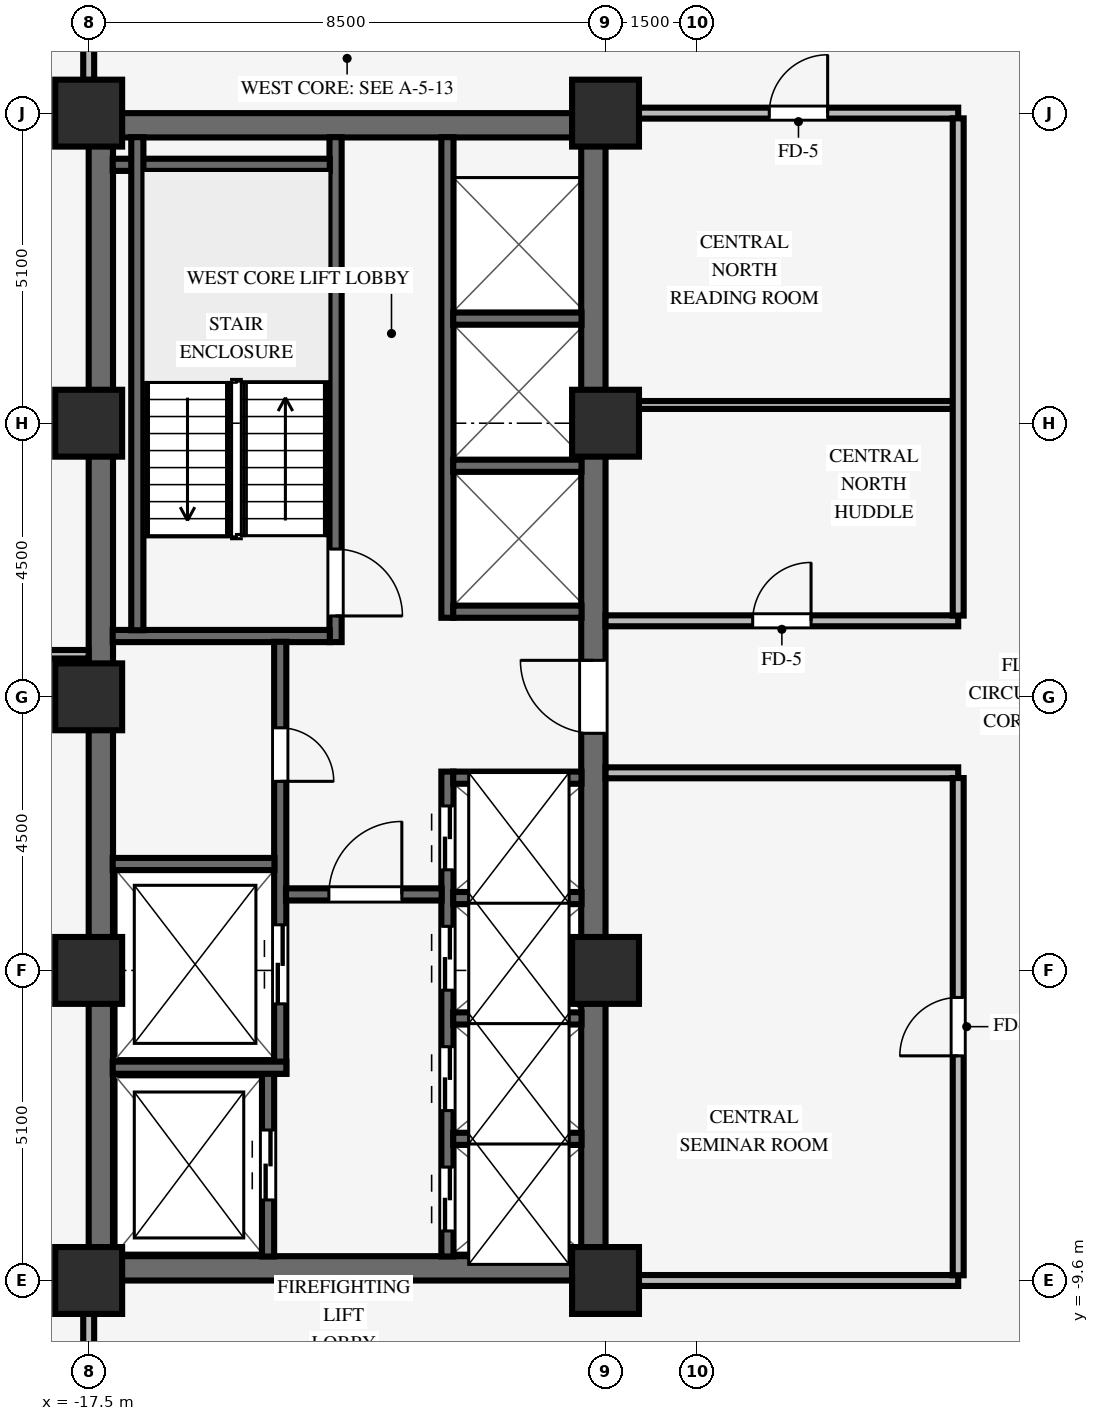
"""IFC4 building model, lengths in metres.
Left out: names, types, materials, properties, quantities, classifications, styles, units other than length and angle.
Written with IfcOpenShell. Run it as: python <this file> out.ifc"""

import sys

from ifc_helpers import new_model, si_unit, direction, frame, frame_2d, origin, origin_2d, place, context, subcontext, project, spatial, rectangle, extrude, source, transform, mapped, element, fill, save


model = new_model("IFC4")
c1 = context("Model", 3, precision=1e-05, world=origin(), true_north=direction((0.0, 1.0)))
c2 = subcontext(c1, "Body", "Model", "MODEL_VIEW")
j1 = project(units=[si_unit("LENGTHUNIT", "METRE"), si_unit("PLANEANGLEUNIT", "RADIAN")], contexts=[c1])
p1 = place(None, origin())
s1 = spatial("IfcSite", under=j1, at=p1, CompositionType="ELEMENT")
p2 = place(p1, origin())
s2 = spatial("IfcBuilding", under=s1, at=p2, CompositionType="ELEMENT")
p3 = place(p2, frame((0.0, 0.0, 98.3)))
s3 = spatial("IfcBuildingStorey", under=s2, at=p3, CompositionType="ELEMENT", Elevation=98.3)
for number, where, z_axis, x_axis in (
    (1, (-17.5, -9.4, 0.0), (0.0, 0.0, 1.0), (1.0, 0.0, 0.0)),
    (2, (-17.5, 9.4, 0.0), (0.0, 0.0, 1.0), (1.0, 0.0, 0.0)),
):
    element("IfcWall", number, at=place(p3, frame(where, z_axis=z_axis, x_axis=x_axis)), inside=s3, PredefinedType="SHEAR", context=c2, shape_type="SweptSolid", body=[
        extrude(rectangle(XDim=8.5, YDim=0.4, at=frame_2d((4.25, 0.0))), origin(), (0.0, 0.0, 1.0), 3.37),
    ])
p4 = place(p3, frame((-17.3, -9.205, 0.0), z_axis=(0.0, 0.0, 1.0), x_axis=(0.0, 1.0, 0.0)))
e3 = element("IfcWall", 3, at=p4, inside=s3, PredefinedType="SHEAR", context=c2, shape_type="SweptSolid", body=[
    extrude(rectangle(XDim=18.41, YDim=0.4, at=frame_2d((9.205, 0.0))), origin(), (0.0, 0.0, 1.0), 3.37),
])
p5 = place(p3, frame((-9.2, -9.205, 0.0), z_axis=(0.0, 0.0, 1.0), x_axis=(0.0, 1.0, 0.0)))
e4 = element("IfcWall", 4, at=p5, inside=s3, PredefinedType="SHEAR", context=c2, shape_type="SweptSolid", body=[
    extrude(rectangle(XDim=18.41, YDim=0.4, at=frame_2d((9.205, 0.0))), origin(), (0.0, 0.0, 1.0), 3.37),
])
p6 = place(p5, frame((8.605, 0.0, 0.0)))
e5 = element("IfcOpeningElement", 5, at=p6, cuts=e4, PredefinedType="OPENING", context=c2, shape_type="SweptSolid", body=[
    extrude(rectangle(XDim=1.2, YDim=2.15, at=frame_2d((0.6, 1.075))), frame((0.0, 0.21, 0.0), z_axis=(0.0, -1.0, 0.0), x_axis=(1.0, 0.0, 0.0)), (0.0, 0.0, 1.0), 0.42),
])
for number, where, z_axis, x_axis in (
    (6, (-17.5, -9.6, 0.0), (0.0, 0.0, 1.0), (1.0, 0.0, 0.0)),
    (7, (-17.5, -4.5, 0.0), (0.0, 0.0, 1.0), (1.0, 0.0, 0.0)),
    (8, (-17.5, 4.5, 0.0), (0.0, 0.0, 1.0), (1.0, 0.0, 0.0)),
    (9, (-17.5, 9.6, 0.0), (0.0, 0.0, 1.0), (1.0, 0.0, 0.0)),
    (10, (-9.0, -9.6, 0.0), (0.0, 0.0, 1.0), (1.0, 0.0, 0.0)),
    (11, (-9.0, -4.5, 0.0), (0.0, 0.0, 1.0), (1.0, 0.0, 0.0)),
    (12, (-9.0, 4.5, 0.0), (0.0, 0.0, 1.0), (1.0, 0.0, 0.0)),
    (13, (-9.0, 9.6, 0.0), (0.0, 0.0, 1.0), (1.0, 0.0, 0.0)),
    (14, (-17.5, 0.0, 0.0), (0.0, 0.0, 1.0), (1.0, 0.0, 0.0)),
):
    element("IfcColumn", number, at=place(p3, frame(where, z_axis=z_axis, x_axis=x_axis)), inside=s3, PredefinedType="COLUMN", context=c2, shape_type="SweptSolid", body=[
        extrude(rectangle(XDim=1.1, YDim=1.1, at=origin_2d()), origin(), (0.0, 0.0, 1.0), 3.37),
    ])
p7 = place(p3, frame((-13.44, 0.9, 0.0), z_axis=(0.0, 0.0, 1.0), x_axis=(0.0, 1.0, 0.0)))
e15 = element("IfcWall", 15, at=p7, inside=s3, PredefinedType="SHEAR", context=c2, shape_type="SweptSolid", body=[
    extrude(rectangle(XDim=8.305, YDim=0.2, at=frame_2d((4.153, 0.0))), origin(), (0.0, 0.0, 1.0), 3.37),
])
p8 = place(p7, frame((1.53, 0.0, 0.0), z_axis=(0.0, 0.0, 1.0), x_axis=(-1.0, 0.0, 0.0)))
e16 = element("IfcOpeningElement", 16, at=p8, cuts=e15, PredefinedType="OPENING", context=c2, shape_type="SweptSolid", body=[
    extrude(rectangle(XDim=1.1, YDim=2.15, at=frame_2d((0.55, 1.075))), frame((0.0, 0.11, 0.0), z_axis=(0.0, -1.0, 0.0), x_axis=(1.0, 0.0, 0.0)), (0.0, 0.0, 1.0), 0.22),
])
for number, where, z_axis, x_axis in (
    (17, (-17.105, 1.0, 0.0), (0.0, 0.0, 1.0), (1.0, 0.0, 0.0)),
    (18, (-17.105, 8.75, 0.0), (0.0, 0.0, 1.0), (1.0, 0.0, 0.0)),
):
    element("IfcWall", number, at=place(p3, frame(where, z_axis=z_axis, x_axis=x_axis)), inside=s3, PredefinedType="SHEAR", context=c2, shape_type="SweptSolid", body=[
        extrude(rectangle(XDim=3.57, YDim=0.2, at=frame_2d((1.785, 0.0))), origin(), (0.0, 0.0, 1.0), 3.37),
    ])
p9 = place(p3, frame((-16.7, 1.095, 0.0), z_axis=(0.0, 0.0, 1.0), x_axis=(0.0, 1.0, 0.0)))
e19 = element("IfcWall", 19, at=p9, inside=s3, PredefinedType="SHEAR", context=c2, shape_type="SweptSolid", body=[
    extrude(rectangle(XDim=8.11, YDim=0.2, at=frame_2d((4.055, 0.0))), origin(), (0.0, 0.0, 1.0), 3.37),
])
p10 = place(p3, frame((-14.55, -9.205, 0.0), z_axis=(0.0, 0.0, 1.0), x_axis=(0.0, 1.0, 0.0)))
e20 = element("IfcWall", 20, at=p10, inside=s3, PredefinedType="SHEAR", context=c2, shape_type="SweptSolid", body=[
    extrude(rectangle(XDim=3.01, YDim=0.2, at=frame_2d((1.505, 0.0))), origin(), (0.0, 0.0, 1.0), 3.37),
])
p11 = place(p10, frame((0.93, 0.0, 0.0)))
e21 = element("IfcOpeningElement", 21, at=p11, cuts=e20, PredefinedType="OPENING", context=c2, shape_type="SweptSolid", body=[
    extrude(rectangle(XDim=1.15, YDim=2.15, at=frame_2d((0.575, 1.075))), frame((0.0, 0.11, 0.0), z_axis=(0.0, -1.0, 0.0), x_axis=(1.0, 0.0, 0.0)), (0.0, 0.0, 1.0), 0.22),
])
p12 = place(p3, frame((-14.35, -6.2, 0.0), z_axis=(0.0, 0.0, 1.0), x_axis=(0.0, 1.0, 0.0)))
e22 = element("IfcWall", 22, at=p12, inside=s3, PredefinedType="SHEAR", context=c2, shape_type="SweptSolid", body=[
    extrude(rectangle(XDim=7.105, YDim=0.2, at=frame_2d((3.552, 0.0))), origin(), (0.0, 0.0, 1.0), 3.37),
])
p13 = place(p12, frame((5.69, 0.0, 0.0), z_axis=(0.0, 0.0, 1.0), x_axis=(-1.0, 0.0, 0.0)))
e23 = element("IfcOpeningElement", 23, at=p13, cuts=e22, PredefinedType="OPENING", context=c2, shape_type="SweptSolid", body=[
    extrude(rectangle(XDim=0.88, YDim=2.1, at=frame_2d((0.44, 1.05))), frame((0.0, 0.11, 0.0), z_axis=(0.0, -1.0, 0.0), x_axis=(1.0, 0.0, 0.0)), (0.0, 0.0, 1.0), 0.22),
])
p14 = place(p12, frame((1.15, 0.0, 0.0)))
e24 = element("IfcOpeningElement", 24, at=p14, cuts=e22, PredefinedType="OPENING", context=c2, shape_type="SweptSolid", body=[
    extrude(rectangle(XDim=1.3, YDim=2.2, at=frame_2d((0.65, 1.1))), frame((0.0, 0.11, 0.0), z_axis=(0.0, -1.0, 0.0), x_axis=(1.0, 0.0, 0.0)), (0.0, 0.0, 1.0), 0.22),
])
p15 = place(p3, frame((-17.105, -6.1, 0.0), z_axis=(0.0, 0.0, 1.0), x_axis=(1.0, 0.0, 0.0)))
e25 = element("IfcWall", 25, at=p15, inside=s3, PredefinedType="SHEAR", context=c2, shape_type="SweptSolid", body=[
    extrude(rectangle(XDim=2.855, YDim=0.2, at=frame_2d((1.427, 0.0))), origin(), (0.0, 0.0, 1.0), 3.37),
])
p16 = place(p3, frame((-17.105, -2.75, 0.0), z_axis=(0.0, 0.0, 1.0), x_axis=(1.0, 0.0, 0.0)))
e26 = element("IfcWall", 26, at=p16, inside=s3, PredefinedType="SHEAR", context=c2, shape_type="SweptSolid", body=[
    extrude(rectangle(XDim=2.66, YDim=0.2, at=frame_2d((1.33, 0.0))), origin(), (0.0, 0.0, 1.0), 3.37),
])
p17 = place(p3, frame((-11.6, -9.205, 0.0), z_axis=(0.0, 0.0, 1.0), x_axis=(0.0, 1.0, 0.0)))
e27 = element("IfcWall", 27, at=p17, inside=s3, PredefinedType="SHEAR", context=c2, shape_type="SweptSolid", body=[
    extrude(rectangle(XDim=7.975, YDim=0.2, at=frame_2d((3.988, 0.0))), origin(), (0.0, 0.0, 1.0), 3.37),
])
p18 = place(p17, frame((0.42, 0.0, 0.0)))
e28 = element("IfcOpeningElement", 28, at=p18, cuts=e27, PredefinedType="OPENING", context=c2, shape_type="SweptSolid", body=[
    extrude(rectangle(XDim=1.05, YDim=2.15, at=frame_2d((0.525, 1.075))), frame((0.0, 0.11, 0.0), z_axis=(0.0, -1.0, 0.0), x_axis=(1.0, 0.0, 0.0)), (0.0, 0.0, 1.0), 0.22),
])
p19 = place(p17, frame((2.4, 0.0, 0.0)))
e29 = element("IfcOpeningElement", 29, at=p19, cuts=e27, PredefinedType="OPENING", context=c2, shape_type="SweptSolid", body=[
    extrude(rectangle(XDim=1.05, YDim=2.15, at=frame_2d((0.525, 1.075))), frame((0.0, 0.11, 0.0), z_axis=(0.0, -1.0, 0.0), x_axis=(1.0, 0.0, 0.0)), (0.0, 0.0, 1.0), 0.22),
])
p20 = place(p17, frame((4.38, 0.0, 0.0)))
e30 = element("IfcOpeningElement", 30, at=p20, cuts=e27, PredefinedType="OPENING", context=c2, shape_type="SweptSolid", body=[
    extrude(rectangle(XDim=1.05, YDim=2.15, at=frame_2d((0.525, 1.075))), frame((0.0, 0.11, 0.0), z_axis=(0.0, -1.0, 0.0), x_axis=(1.0, 0.0, 0.0)), (0.0, 0.0, 1.0), 0.22),
])
p21 = place(p17, frame((6.36, 0.0, 0.0)))
e31 = element("IfcOpeningElement", 31, at=p21, cuts=e27, PredefinedType="OPENING", context=c2, shape_type="SweptSolid", body=[
    extrude(rectangle(XDim=1.05, YDim=2.15, at=frame_2d((0.525, 1.075))), frame((0.0, 0.11, 0.0), z_axis=(0.0, -1.0, 0.0), x_axis=(1.0, 0.0, 0.0)), (0.0, 0.0, 1.0), 0.22),
])
p22 = place(p3, frame((-14.255, -3.25, 0.0), z_axis=(0.0, 0.0, 1.0), x_axis=(1.0, 0.0, 0.0)))
e32 = element("IfcWall", 32, at=p22, inside=s3, PredefinedType="SHEAR", context=c2, shape_type="SweptSolid", body=[
    extrude(rectangle(XDim=2.56, YDim=0.2, at=frame_2d((1.28, 0.0))), origin(), (0.0, 0.0, 1.0), 3.37),
])
p23 = place(p22, frame((0.705, 0.0, 0.0)))
e33 = element("IfcOpeningElement", 33, at=p23, cuts=e32, PredefinedType="OPENING", context=c2, shape_type="SweptSolid", body=[
    extrude(rectangle(XDim=1.2, YDim=2.15, at=frame_2d((0.6, 1.075))), frame((0.0, 0.11, 0.0), z_axis=(0.0, -1.0, 0.0), x_axis=(1.0, 0.0, 0.0)), (0.0, 0.0, 1.0), 0.22),
])
for number, where, z_axis, x_axis in (
    (34, (-11.505, -7.27, 0.0), (0.0, 0.0, 1.0), (1.0, 0.0, 0.0)),
    (35, (-11.505, -5.29, 0.0), (0.0, 0.0, 1.0), (1.0, 0.0, 0.0)),
    (36, (-11.505, -3.31, 0.0), (0.0, 0.0, 1.0), (1.0, 0.0, 0.0)),
    (37, (-11.505, -1.33, 0.0), (0.0, 0.0, 1.0), (1.0, 0.0, 0.0)),
):
    element("IfcWall", number, at=place(p3, frame(where, z_axis=z_axis, x_axis=x_axis)), inside=s3, PredefinedType="SHEAR", context=c2, shape_type="SweptSolid", body=[
        extrude(rectangle(XDim=2.11, YDim=0.2, at=frame_2d((1.055, 0.0))), origin(), (0.0, 0.0, 1.0), 3.37),
    ])
p24 = place(p3, frame((-11.6, 1.3, 0.0), z_axis=(0.0, 0.0, 1.0), x_axis=(0.0, 1.0, 0.0)))
e38 = element("IfcWall", 38, at=p24, inside=s3, PredefinedType="SHEAR", context=c2, shape_type="SweptSolid", body=[
    extrude(rectangle(XDim=7.905, YDim=0.2, at=frame_2d((3.953, 0.0))), origin(), (0.0, 0.0, 1.0), 3.37),
])
for number, where, z_axis, x_axis in (
    (39, (-11.505, 1.4, 0.0), (0.0, 0.0, 1.0), (1.0, 0.0, 0.0)),
    (40, (-11.505, 3.8, 0.0), (0.0, 0.0, 1.0), (1.0, 0.0, 0.0)),
    (41, (-11.505, 6.22, 0.0), (0.0, 0.0, 1.0), (1.0, 0.0, 0.0)),
):
    element("IfcWall", number, at=place(p3, frame(where, z_axis=z_axis, x_axis=x_axis)), inside=s3, PredefinedType="SHEAR", context=c2, shape_type="SweptSolid", body=[
        extrude(rectangle(XDim=2.11, YDim=0.2, at=frame_2d((1.055, 0.0))), origin(), (0.0, 0.0, 1.0), 3.37),
    ])
p25 = place(p3, frame((-8.454, -9.6, 0.0), z_axis=(0.0, 0.0, 1.0), x_axis=(1.0, 0.0, 0.0)))
e42 = element("IfcWall", 42, at=p25, inside=s3, PredefinedType="PARTITIONING", context=c2, shape_type="SweptSolid", body=[
    extrude(rectangle(XDim=5.254, YDim=0.18, at=frame_2d((2.627, 0.0))), origin(), (0.0, 0.0, 1.0), 2.405),
])
p26 = place(p3, frame((-9.0, -1.25, 0.0), z_axis=(0.0, 0.0, 1.0), x_axis=(1.0, 0.0, 0.0)))
e43 = element("IfcWall", 43, at=p26, inside=s3, PredefinedType="PARTITIONING", context=c2, shape_type="SweptSolid", body=[
    extrude(rectangle(XDim=5.8, YDim=0.18, at=frame_2d((2.9, 0.0))), origin(), (0.0, 0.0, 1.0), 3.36),
])
p27 = place(p3, frame((-23.68, 0.7, 0.0), z_axis=(0.0, 0.0, 1.0), x_axis=(1.0, 0.0, 0.0)))
e44 = element("IfcWall", 44, at=p27, inside=s3, PredefinedType="PARTITIONING", context=c2, shape_type="SweptSolid", body=[
    extrude(rectangle(XDim=6.18, YDim=0.14, at=frame_2d((3.09, 0.0))), origin(), (0.0, 0.0, 1.0), 3.36),
])
p28 = place(p3, frame((-9.0, 1.25, 0.0), z_axis=(0.0, 0.0, 1.0), x_axis=(1.0, 0.0, 0.0)))
e45 = element("IfcWall", 45, at=p28, inside=s3, PredefinedType="PARTITIONING", context=c2, shape_type="SweptSolid", body=[
    extrude(rectangle(XDim=5.8, YDim=0.18, at=frame_2d((2.9, 0.0))), origin(), (0.0, 0.0, 1.0), 3.36),
])
p29 = place(p28, frame((2.42, 0.0, 0.0)))
e46 = element("IfcOpeningElement", 46, at=p29, cuts=e45, PredefinedType="OPENING", context=c2, shape_type="SweptSolid", body=[
    extrude(rectangle(XDim=0.96, YDim=2.1, at=frame_2d((0.48, 1.05))), frame((0.0, 0.1, 0.0), z_axis=(0.0, -1.0, 0.0), x_axis=(1.0, 0.0, 0.0)), (0.0, 0.0, 1.0), 0.2),
])
p30 = place(p3, frame((-8.454, 4.8, 0.0), z_axis=(0.0, 0.0, 1.0), x_axis=(1.0, 0.0, 0.0)))
e47 = element("IfcWall", 47, at=p30, inside=s3, PredefinedType="PARTITIONING", context=c2, shape_type="SweptSolid", body=[
    extrude(rectangle(XDim=5.168, YDim=0.13, at=frame_2d((2.584, 0.0))), origin(), (0.0, 0.0, 1.0), 2.738),
])
p31 = place(p3, frame((-8.454, 9.6, 0.0), z_axis=(0.0, 0.0, 1.0), x_axis=(1.0, 0.0, 0.0)))
e48 = element("IfcWall", 48, at=p31, inside=s3, PredefinedType="PARTITIONING", context=c2, shape_type="SweptSolid", body=[
    extrude(rectangle(XDim=5.254, YDim=0.18, at=frame_2d((2.627, 0.0))), origin(), (0.0, 0.0, 1.0), 2.405),
])
p32 = place(p31, frame((2.147, 0.0, 0.0)))
e49 = element("IfcOpeningElement", 49, at=p32, cuts=e48, PredefinedType="OPENING", context=c2, shape_type="SweptSolid", body=[
    extrude(rectangle(XDim=0.96, YDim=2.1, at=frame_2d((0.48, 1.05))), frame((0.0, 0.1, 0.0), z_axis=(0.0, -1.0, 0.0), x_axis=(1.0, 0.0, 0.0)), (0.0, 0.0, 1.0), 0.2),
])
for number, where, z_axis, x_axis in (
    (50, (-17.5, -11.114, 0.0), (0.0, 0.0, 1.0), (0.0, 1.0, 0.0)),
    (51, (-17.5, 10.146, 0.0), (0.0, 0.0, 1.0), (0.0, 1.0, 0.0)),
):
    element("IfcWall", number, at=place(p3, frame(where, z_axis=z_axis, x_axis=x_axis)), inside=s3, PredefinedType="PARTITIONING", context=c2, shape_type="SweptSolid", body=[
        extrude(rectangle(XDim=0.968, YDim=0.18, at=frame_2d((0.484, 0.0))), origin(), (0.0, 0.0, 1.0), 2.738),
    ])
p33 = place(p3, frame((-3.2, -9.514, 0.0), z_axis=(0.0, 0.0, 1.0), x_axis=(0.0, 1.0, 0.0)))
e52 = element("IfcWall", 52, at=p33, inside=s3, PredefinedType="PARTITIONING", context=c2, shape_type="SweptSolid", body=[
    extrude(rectangle(XDim=8.178, YDim=0.18, at=frame_2d((4.089, 0.0))), origin(), (0.0, 0.0, 1.0), 3.36),
])
p34 = place(p33, frame((3.609, 0.0, 0.0)))
e53 = element("IfcOpeningElement", 53, at=p34, cuts=e52, PredefinedType="OPENING", context=c2, shape_type="SweptSolid", body=[
    extrude(rectangle(XDim=0.96, YDim=2.1, at=frame_2d((0.48, 1.05))), frame((0.0, 0.1, 0.0), z_axis=(0.0, -1.0, 0.0), x_axis=(1.0, 0.0, 0.0)), (0.0, 0.0, 1.0), 0.2),
])
p35 = place(p3, frame((-3.2, 1.336, 0.0), z_axis=(0.0, 0.0, 1.0), x_axis=(0.0, 1.0, 0.0)))
e54 = element("IfcWall", 54, at=p35, inside=s3, PredefinedType="PARTITIONING", context=c2, shape_type="SweptSolid", body=[
    extrude(rectangle(XDim=8.178, YDim=0.18, at=frame_2d((4.089, 0.0))), origin(), (0.0, 0.0, 1.0), 3.36),
])
m1 = source(origin(), c2, "Body", "SweptSolid", [
    extrude(rectangle(XDim=1.1, YDim=2.15, at=frame_2d((0.55, 1.075))), frame((0.0, 0.025, 0.0), z_axis=(0.0, -1.0, 0.0), x_axis=(1.0, 0.0, 0.0)), (0.0, 0.0, 1.0), 0.05),
])
p36 = place(p8, origin())
e55 = element("IfcDoor", 55, at=p36, inside=s3, OperationType="SINGLE_SWING_RIGHT", PredefinedType="DOOR", context=c2, shape_type="MappedRepresentation", body=[
    mapped(m1, transform((0.0, 0.0, 0.0), scale=1.0)),
])
fill(e16, e55)
m2 = source(origin(), c2, "Body", "SweptSolid", [
    extrude(rectangle(XDim=0.88, YDim=2.1, at=frame_2d((0.44, 1.05))), frame((0.0, 0.025, 0.0), z_axis=(0.0, -1.0, 0.0), x_axis=(1.0, 0.0, 0.0)), (0.0, 0.0, 1.0), 0.05),
])
p37 = place(p13, origin())
e56 = element("IfcDoor", 56, at=p37, inside=s3, OperationType="SINGLE_SWING_RIGHT", PredefinedType="DOOR", context=c2, shape_type="MappedRepresentation", body=[
    mapped(m2, transform((0.0, 0.0, 0.0), scale=1.0)),
])
fill(e23, e56)
m3 = source(origin(), c2, "Body", "SweptSolid", [
    extrude(rectangle(XDim=1.2, YDim=2.15, at=frame_2d((0.6, 1.075))), frame((0.0, 0.025, 0.0), z_axis=(0.0, -1.0, 0.0), x_axis=(1.0, 0.0, 0.0)), (0.0, 0.0, 1.0), 0.05),
])
p38 = place(p23, origin())
e57 = element("IfcDoor", 57, at=p38, inside=s3, OperationType="SINGLE_SWING_RIGHT", PredefinedType="DOOR", context=c2, shape_type="MappedRepresentation", body=[
    mapped(m3, transform((0.0, 0.0, 0.0), scale=1.0)),
])
fill(e33, e57)
p39 = place(p6, origin())
e58 = element("IfcDoor", 58, at=p39, inside=s3, OperationType="SINGLE_SWING_RIGHT", PredefinedType="DOOR", context=c2, shape_type="MappedRepresentation", body=[
    mapped(m3, transform((0.0, 0.0, 0.0), scale=1.0)),
])
fill(e5, e58)
m4 = source(origin(), c2, "Body", "SweptSolid", [
    extrude(rectangle(XDim=1.15, YDim=2.15, at=frame_2d((0.575, 1.075))), frame((0.0, 0.025, 0.0), z_axis=(0.0, -1.0, 0.0), x_axis=(1.0, 0.0, 0.0)), (0.0, 0.0, 1.0), 0.05),
])
p40 = place(p11, origin())
e59 = element("IfcDoor", 59, at=p40, inside=s3, OperationType="DOUBLE_DOOR_SLIDING", PredefinedType="DOOR", context=c2, shape_type="MappedRepresentation", body=[
    mapped(m4, transform((0.0, 0.0, 0.0), scale=1.0)),
])
fill(e21, e59)
m5 = source(origin(), c2, "Body", "SweptSolid", [
    extrude(rectangle(XDim=1.3, YDim=2.2, at=frame_2d((0.65, 1.1))), frame((0.0, 0.025, 0.0), z_axis=(0.0, -1.0, 0.0), x_axis=(1.0, 0.0, 0.0)), (0.0, 0.0, 1.0), 0.05),
])
p41 = place(p14, origin())
e60 = element("IfcDoor", 60, at=p41, inside=s3, OperationType="DOUBLE_DOOR_SLIDING", PredefinedType="DOOR", context=c2, shape_type="MappedRepresentation", body=[
    mapped(m5, transform((0.0, 0.0, 0.0), scale=1.0)),
])
fill(e24, e60)
m6 = source(origin(), c2, "Body", "SweptSolid", [
    extrude(rectangle(XDim=1.05, YDim=2.15, at=frame_2d((0.525, 1.075))), frame((0.0, 0.025, 0.0), z_axis=(0.0, -1.0, 0.0), x_axis=(1.0, 0.0, 0.0)), (0.0, 0.0, 1.0), 0.05),
])
p42 = place(p18, origin())
e61 = element("IfcDoor", 61, at=p42, inside=s3, OperationType="DOUBLE_DOOR_SLIDING", PredefinedType="DOOR", context=c2, shape_type="MappedRepresentation", body=[
    mapped(m6, transform((0.0, 0.0, 0.0), scale=1.0)),
])
fill(e28, e61)
p43 = place(p19, origin())
e62 = element("IfcDoor", 62, at=p43, inside=s3, OperationType="DOUBLE_DOOR_SLIDING", PredefinedType="DOOR", context=c2, shape_type="MappedRepresentation", body=[
    mapped(m6, transform((0.0, 0.0, 0.0), scale=1.0)),
])
fill(e29, e62)
p44 = place(p20, origin())
e63 = element("IfcDoor", 63, at=p44, inside=s3, OperationType="DOUBLE_DOOR_SLIDING", PredefinedType="DOOR", context=c2, shape_type="MappedRepresentation", body=[
    mapped(m6, transform((0.0, 0.0, 0.0), scale=1.0)),
])
fill(e30, e63)
p45 = place(p21, origin())
e64 = element("IfcDoor", 64, at=p45, inside=s3, OperationType="DOUBLE_DOOR_SLIDING", PredefinedType="DOOR", context=c2, shape_type="MappedRepresentation", body=[
    mapped(m6, transform((0.0, 0.0, 0.0), scale=1.0)),
])
fill(e31, e64)
m7 = source(origin(), c2, "Body", "SweptSolid", [
    extrude(rectangle(XDim=0.96, YDim=2.1, at=frame_2d((0.48, 1.05))), frame((0.0, 0.025, 0.0), z_axis=(0.0, -1.0, 0.0), x_axis=(1.0, 0.0, 0.0)), (0.0, 0.0, 1.0), 0.05),
])
p46 = place(p34, origin())
e65 = element("IfcDoor", 65, at=p46, inside=s3, OperationType="SINGLE_SWING_LEFT", PredefinedType="DOOR", context=c2, shape_type="MappedRepresentation", body=[
    mapped(m7, transform((0.0, 0.0, 0.0), scale=1.0)),
])
fill(e53, e65)
p47 = place(p29, origin())
e66 = element("IfcDoor", 66, at=p47, inside=s3, OperationType="SINGLE_SWING_RIGHT", PredefinedType="DOOR", context=c2, shape_type="MappedRepresentation", body=[
    mapped(m7, transform((0.0, 0.0, 0.0), scale=1.0)),
])
fill(e46, e66)
p48 = place(p32, origin())
e67 = element("IfcDoor", 67, at=p48, inside=s3, OperationType="SINGLE_SWING_RIGHT", PredefinedType="DOOR", context=c2, shape_type="MappedRepresentation", body=[
    mapped(m7, transform((0.0, 0.0, 0.0), scale=1.0)),
])
fill(e49, e67)
save(model, sys.argv[1])
